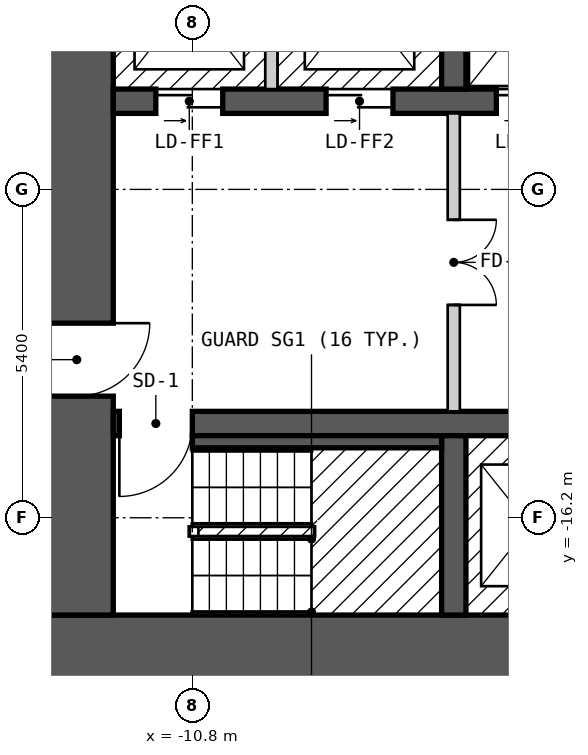
"""IFC4 building model, lengths in metres.
Left out: names, types, materials, properties, quantities, classifications, styles, units other than length and angle.
Written with IfcOpenShell. Run it as: python <this file> out.ifc"""

import sys

from ifc_helpers import new_model, si_unit, direction, frame, frame_2d, origin, place, context, subcontext, project, spatial, rectangle, extrude, element, fill, save


model = new_model("IFC4")
c1 = context("Model", 3, precision=1e-05, world=origin(), true_north=direction((0.0, 1.0)))
c2 = subcontext(c1, "Body", "Model", "MODEL_VIEW")
j1 = project(units=[si_unit("LENGTHUNIT", "METRE"), si_unit("PLANEANGLEUNIT", "RADIAN")], contexts=[c1])
p1 = place(None, origin())
s1 = spatial("IfcSite", under=j1, at=p1, CompositionType="ELEMENT")
p2 = place(p1, origin())
s2 = spatial("IfcBuilding", under=s1, at=p2, CompositionType="ELEMENT")
p3 = place(p2, frame((0.0, 0.0, 47.4)))
s3 = spatial("IfcBuildingStorey", under=s2, at=p3, CompositionType="ELEMENT", Elevation=47.4)
p4 = place(p3, frame((-13.3, -18.4, 0.0), z_axis=(0.0, 0.0, 1.0), x_axis=(1.0, 0.0, 0.0)))
e1 = element("IfcWall", 1, at=p4, inside=s3, PredefinedType="SHEAR", context=c2, shape_type="SweptSolid", body=[
    extrude(rectangle(XDim=26.6, YDim=1.2, at=frame_2d((13.3, 0.0))), origin(), (0.0, 0.0, 1.0), 2.7),
])
p5 = place(p3, frame((-12.7, -17.8, 0.0), z_axis=(0.0, 0.0, 1.0), x_axis=(0.0, 1.0, 0.0)))
e2 = element("IfcWall", 2, at=p5, inside=s3, PredefinedType="SHEAR", context=c2, shape_type="SweptSolid", body=[
    extrude(rectangle(XDim=11.6, YDim=1.2, at=frame_2d((5.8, 0.0))), origin(), (0.0, 0.0, 1.0), 2.7),
])
p6 = place(p5, frame((3.6, 0.0, 0.0)))
e3 = element("IfcOpeningElement", 3, at=p6, cuts=e2, PredefinedType="OPENING", context=c2, shape_type="SweptSolid", body=[
    extrude(rectangle(XDim=1.2, YDim=2.1, at=frame_2d((0.6, 1.05))), frame((0.0, 0.61, 0.0), z_axis=(0.0, -1.0, 0.0), x_axis=(1.0, 0.0, 0.0)), (0.0, 0.0, 1.0), 1.22),
])
p7 = place(p3, frame((-12.1, -14.65, 0.0), z_axis=(0.0, 0.0, 1.0), x_axis=(1.0, 0.0, 0.0)))
e4 = element("IfcWall", 4, at=p7, inside=s3, PredefinedType="SHEAR", context=c2, shape_type="SweptSolid", body=[
    extrude(rectangle(XDim=24.2, YDim=0.4, at=frame_2d((12.1, 0.0))), origin(), (0.0, 0.0, 1.0), 2.7),
])
p8 = place(p7, frame((1.3, 0.0, 0.0), z_axis=(0.0, 0.0, 1.0), x_axis=(-1.0, 0.0, 0.0)))
e5 = element("IfcOpeningElement", 5, at=p8, cuts=e4, PredefinedType="OPENING", context=c2, shape_type="SweptSolid", body=[
    extrude(rectangle(XDim=1.2, YDim=2.1, at=frame_2d((0.6, 1.05))), frame((0.0, 0.21, 0.0), z_axis=(0.0, -1.0, 0.0), x_axis=(1.0, 0.0, 0.0)), (0.0, 0.0, 1.0), 0.42),
])
p9 = place(p7, frame((24.15, 0.0, 0.0), z_axis=(0.0, 0.0, 1.0), x_axis=(-1.0, 0.0, 0.0)))
e6 = element("IfcOpeningElement", 6, at=p9, cuts=e4, PredefinedType="OPENING", context=c2, shape_type="SweptSolid", body=[
    extrude(rectangle(XDim=1.2, YDim=2.1, at=frame_2d((0.6, 1.05))), frame((0.0, 0.21, 0.0), z_axis=(0.0, -1.0, 0.0), x_axis=(1.0, 0.0, 0.0)), (0.0, 0.0, 1.0), 0.42),
])
p10 = place(p7, frame((16.25, 0.0, 0.0), z_axis=(0.0, 0.0, 1.0), x_axis=(-1.0, 0.0, 0.0)))
e7 = element("IfcOpeningElement", 7, at=p10, cuts=e4, PredefinedType="OPENING", context=c2, shape_type="SweptSolid", body=[
    extrude(rectangle(XDim=0.9, YDim=2.1, at=frame_2d((0.45, 1.05))), frame((0.0, 0.21, 0.0), z_axis=(0.0, -1.0, 0.0), x_axis=(1.0, 0.0, 0.0)), (0.0, 0.0, 1.0), 0.42),
])
p11 = place(p7, frame((18.05, 0.0, 0.0), z_axis=(0.0, 0.0, 1.0), x_axis=(-1.0, 0.0, 0.0)))
e8 = element("IfcOpeningElement", 8, at=p11, cuts=e4, PredefinedType="OPENING", context=c2, shape_type="SweptSolid", body=[
    extrude(rectangle(XDim=0.9, YDim=2.1, at=frame_2d((0.45, 1.05))), frame((0.0, 0.21, 0.0), z_axis=(0.0, -1.0, 0.0), x_axis=(1.0, 0.0, 0.0)), (0.0, 0.0, 1.0), 0.42),
])
p12 = place(p3, frame((-12.1, -9.35, 0.0), z_axis=(0.0, 0.0, 1.0), x_axis=(1.0, 0.0, 0.0)))
e9 = element("IfcWall", 9, at=p12, inside=s3, PredefinedType="SHEAR", context=c2, shape_type="SweptSolid", body=[
    extrude(rectangle(XDim=22.3, YDim=0.4, at=frame_2d((11.15, 0.0))), origin(), (0.0, 0.0, 1.0), 2.7),
])
p13 = place(p12, frame((0.7, 0.0, 0.0)))
e10 = element("IfcOpeningElement", 10, at=p13, cuts=e9, PredefinedType="OPENING", context=c2, shape_type="SweptSolid", body=[
    extrude(rectangle(XDim=1.1, YDim=2.1, at=frame_2d((0.55, 1.05))), frame((0.0, 0.21, 0.0), z_axis=(0.0, -1.0, 0.0), x_axis=(1.0, 0.0, 0.0)), (0.0, 0.0, 1.0), 0.42),
])
p14 = place(p12, frame((3.5, 0.0, 0.0)))
e11 = element("IfcOpeningElement", 11, at=p14, cuts=e9, PredefinedType="OPENING", context=c2, shape_type="SweptSolid", body=[
    extrude(rectangle(XDim=1.1, YDim=2.1, at=frame_2d((0.55, 1.05))), frame((0.0, 0.21, 0.0), z_axis=(0.0, -1.0, 0.0), x_axis=(1.0, 0.0, 0.0)), (0.0, 0.0, 1.0), 0.42),
])
p15 = place(p12, frame((6.3, 0.0, 0.0)))
e12 = element("IfcOpeningElement", 12, at=p15, cuts=e9, PredefinedType="OPENING", context=c2, shape_type="SweptSolid", body=[
    extrude(rectangle(XDim=1.1, YDim=2.1, at=frame_2d((0.55, 1.05))), frame((0.0, 0.21, 0.0), z_axis=(0.0, -1.0, 0.0), x_axis=(1.0, 0.0, 0.0)), (0.0, 0.0, 1.0), 0.42),
])
p16 = place(p12, frame((8.6, 0.0, 0.0)))
e13 = element("IfcOpeningElement", 13, at=p16, cuts=e9, PredefinedType="OPENING", context=c2, shape_type="SweptSolid", body=[
    extrude(rectangle(XDim=1.1, YDim=2.1, at=frame_2d((0.55, 1.05))), frame((0.0, 0.21, 0.0), z_axis=(0.0, -1.0, 0.0), x_axis=(1.0, 0.0, 0.0)), (0.0, 0.0, 1.0), 0.42),
])
p17 = place(p12, frame((10.9, 0.0, 0.0)))
e14 = element("IfcOpeningElement", 14, at=p17, cuts=e9, PredefinedType="OPENING", context=c2, shape_type="SweptSolid", body=[
    extrude(rectangle(XDim=1.1, YDim=2.1, at=frame_2d((0.55, 1.05))), frame((0.0, 0.21, 0.0), z_axis=(0.0, -1.0, 0.0), x_axis=(1.0, 0.0, 0.0)), (0.0, 0.0, 1.0), 0.42),
])
p18 = place(p12, frame((13.2, 0.0, 0.0)))
e15 = element("IfcOpeningElement", 15, at=p18, cuts=e9, PredefinedType="OPENING", context=c2, shape_type="SweptSolid", body=[
    extrude(rectangle(XDim=1.1, YDim=2.1, at=frame_2d((0.55, 1.05))), frame((0.0, 0.21, 0.0), z_axis=(0.0, -1.0, 0.0), x_axis=(1.0, 0.0, 0.0)), (0.0, 0.0, 1.0), 0.42),
])
p19 = place(p12, frame((15.5, 0.0, 0.0)))
e16 = element("IfcOpeningElement", 16, at=p19, cuts=e9, PredefinedType="OPENING", context=c2, shape_type="SweptSolid", body=[
    extrude(rectangle(XDim=1.1, YDim=2.1, at=frame_2d((0.55, 1.05))), frame((0.0, 0.21, 0.0), z_axis=(0.0, -1.0, 0.0), x_axis=(1.0, 0.0, 0.0)), (0.0, 0.0, 1.0), 0.42),
])
p20 = place(p12, frame((17.8, 0.0, 0.0)))
e17 = element("IfcOpeningElement", 17, at=p20, cuts=e9, PredefinedType="OPENING", context=c2, shape_type="SweptSolid", body=[
    extrude(rectangle(XDim=1.1, YDim=2.1, at=frame_2d((0.55, 1.05))), frame((0.0, 0.21, 0.0), z_axis=(0.0, -1.0, 0.0), x_axis=(1.0, 0.0, 0.0)), (0.0, 0.0, 1.0), 0.42),
])
p21 = place(p12, frame((20.2, 0.0, 0.0)))
e18 = element("IfcOpeningElement", 18, at=p21, cuts=e9, PredefinedType="OPENING", context=c2, shape_type="SweptSolid", body=[
    extrude(rectangle(XDim=1.1, YDim=2.1, at=frame_2d((0.55, 1.05))), frame((0.0, 0.21, 0.0), z_axis=(0.0, -1.0, 0.0), x_axis=(1.0, 0.0, 0.0)), (0.0, 0.0, 1.0), 0.42),
])
for number, where, z_axis, x_axis in (
    (19, (-6.5, -17.8, 0.0), (0.0, 0.0, 1.0), (0.0, 1.0, 0.0)),
    (20, (-6.5, -9.15, 0.0), (0.0, 0.0, 1.0), (0.0, 1.0, 0.0)),
):
    element("IfcWall", number, at=place(p3, frame(where, z_axis=z_axis, x_axis=x_axis)), inside=s3, PredefinedType="SHEAR", context=c2, shape_type="SweptSolid", body=[
        extrude(rectangle(XDim=2.95, YDim=0.4, at=frame_2d((1.475, 0.0))), origin(), (0.0, 0.0, 1.0), 2.7),
    ])
p22 = place(p3, frame((-10.8, -14.95, 0.0), z_axis=(0.0, 0.0, 1.0), x_axis=(1.0, 0.0, 0.0)))
e21 = element("IfcWall", 21, at=p22, inside=s3, PredefinedType="SOLIDWALL", context=c2, shape_type="SweptSolid", body=[
    extrude(rectangle(XDim=4.1, YDim=0.2, at=frame_2d((2.05, 0.0))), origin(), (0.0, 0.0, 1.0), 2.7),
])
p23 = place(p3, frame((-9.5, -9.15, 0.0), z_axis=(0.0, 0.0, 1.0), x_axis=(0.0, 1.0, 0.0)))
e22 = element("IfcWall", 22, at=p23, inside=s3, PredefinedType="SOLIDWALL", context=c2, shape_type="SweptSolid", body=[
    extrude(rectangle(XDim=2.95, YDim=0.2, at=frame_2d((1.475, 0.0))), origin(), (0.0, 0.0, 1.0), 2.7),
])
p24 = place(p3, frame((-6.5, -14.45, 0.0), z_axis=(0.0, 0.0, 1.0), x_axis=(0.0, 1.0, 0.0)))
e23 = element("IfcWall", 23, at=p24, inside=s3, PredefinedType="PARTITIONING", context=c2, shape_type="SweptSolid", body=[
    extrude(rectangle(XDim=4.9, YDim=0.2, at=frame_2d((2.45, 0.0))), origin(), (0.0, 0.0, 1.0), 2.7),
])
p25 = place(p24, frame((3.15, 0.0, 0.0), z_axis=(0.0, 0.0, 1.0), x_axis=(-1.0, 0.0, 0.0)))
e24 = element("IfcOpeningElement", 24, at=p25, cuts=e23, PredefinedType="OPENING", context=c2, shape_type="SweptSolid", body=[
    extrude(rectangle(XDim=1.4, YDim=2.1, at=frame_2d((0.7, 1.05))), frame((0.0, 0.11, 0.0), z_axis=(0.0, -1.0, 0.0), x_axis=(1.0, 0.0, 0.0)), (0.0, 0.0, 1.0), 0.22),
])
p26 = place(p13, origin())
e25 = element("IfcDoor", 25, at=p26, inside=s3, OperationType="DOUBLE_DOOR_SLIDING", PredefinedType="DOOR", context=c2, shape_type="SweptSolid", body=[
    extrude(rectangle(XDim=1.1, YDim=2.1, at=frame_2d((0.55, 1.05))), frame((0.0, 0.025, 0.0), z_axis=(0.0, -1.0, 0.0), x_axis=(1.0, 0.0, 0.0)), (0.0, 0.0, 1.0), 0.05),
])
fill(e10, e25)
p27 = place(p14, origin())
e26 = element("IfcDoor", 26, at=p27, inside=s3, OperationType="DOUBLE_DOOR_SLIDING", PredefinedType="DOOR", context=c2, shape_type="SweptSolid", body=[
    extrude(rectangle(XDim=1.1, YDim=2.1, at=frame_2d((0.55, 1.05))), frame((0.0, 0.025, 0.0), z_axis=(0.0, -1.0, 0.0), x_axis=(1.0, 0.0, 0.0)), (0.0, 0.0, 1.0), 0.05),
])
fill(e11, e26)
p28 = place(p15, origin())
e27 = element("IfcDoor", 27, at=p28, inside=s3, OperationType="DOUBLE_DOOR_SLIDING", PredefinedType="DOOR", context=c2, shape_type="SweptSolid", body=[
    extrude(rectangle(XDim=1.1, YDim=2.1, at=frame_2d((0.55, 1.05))), frame((0.0, 0.025, 0.0), z_axis=(0.0, -1.0, 0.0), x_axis=(1.0, 0.0, 0.0)), (0.0, 0.0, 1.0), 0.05),
])
fill(e12, e27)
p29 = place(p8, origin())
e28 = element("IfcDoor", 28, at=p29, inside=s3, OperationType="SINGLE_SWING_RIGHT", PredefinedType="DOOR", context=c2, shape_type="SweptSolid", body=[
    extrude(rectangle(XDim=1.2, YDim=2.1, at=frame_2d((0.6, 1.05))), frame((0.0, 0.025, 0.0), z_axis=(0.0, -1.0, 0.0), x_axis=(1.0, 0.0, 0.0)), (0.0, 0.0, 1.0), 0.05),
])
fill(e5, e28)
p30 = place(p6, origin())
e29 = element("IfcDoor", 29, at=p30, inside=s3, OperationType="SINGLE_SWING_RIGHT", PredefinedType="DOOR", context=c2, shape_type="SweptSolid", body=[
    extrude(rectangle(XDim=1.2, YDim=2.1, at=frame_2d((0.6, 1.05))), frame((0.0, 0.025, 0.0), z_axis=(0.0, -1.0, 0.0), x_axis=(1.0, 0.0, 0.0)), (0.0, 0.0, 1.0), 0.05),
])
fill(e3, e29)
p31 = place(p25, origin())
e30 = element("IfcDoor", 30, at=p31, inside=s3, OperationType="DOUBLE_DOOR_SINGLE_SWING", PredefinedType="DOOR", context=c2, shape_type="SweptSolid", body=[
    extrude(rectangle(XDim=1.4, YDim=2.1, at=frame_2d((0.7, 1.05))), frame((0.0, 0.025, 0.0), z_axis=(0.0, -1.0, 0.0), x_axis=(1.0, 0.0, 0.0)), (0.0, 0.0, 1.0), 0.05),
])
fill(e24, e30)
save(model, sys.argv[1])
